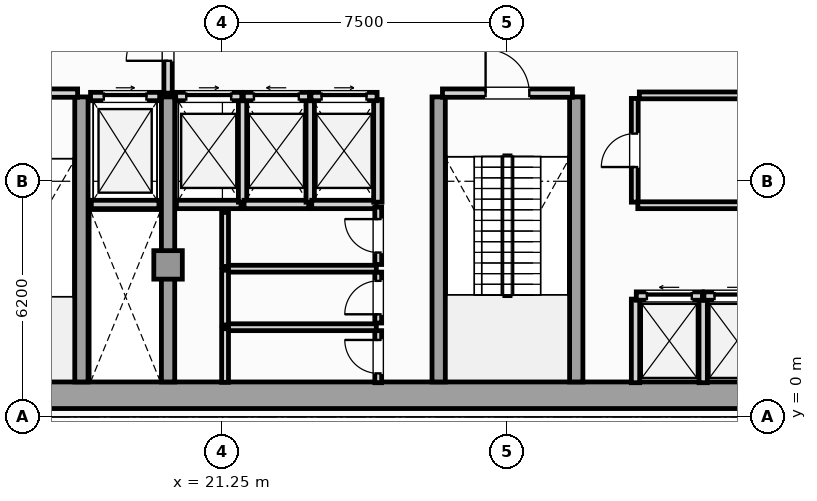
"""IFC4 building model, lengths in metres.
Left out: names, types, materials, properties, quantities, classifications, styles, units other than length and angle.
Written with IfcOpenShell. Run it as: python <this file> out.ifc"""

import sys

from ifc_helpers import new_model, si_unit, direction, frame, frame_2d, origin, origin_2d, place, context, subcontext, project, spatial, rectangle, extrude, element, fill, save


model = new_model("IFC4")
c1 = context("Model", 3, precision=1e-05, world=origin(), true_north=direction((0.0, 1.0)))
c2 = subcontext(c1, "Body", "Model", "MODEL_VIEW")
j1 = project(units=[si_unit("LENGTHUNIT", "METRE"), si_unit("PLANEANGLEUNIT", "RADIAN")], contexts=[c1])
p1 = place(None, origin())
s1 = spatial("IfcSite", under=j1, at=p1, CompositionType="ELEMENT")
p2 = place(p1, origin())
s2 = spatial("IfcBuilding", under=s1, at=p2, CompositionType="ELEMENT")
p3 = place(p2, frame((0.0, 0.0, 140.15)))
s3 = spatial("IfcBuildingStorey", under=s2, at=p3, CompositionType="ELEMENT", Elevation=140.15)
p4 = place(p3, frame((13.25, 0.57, 0.0), z_axis=(0.0, 0.0, 1.0), x_axis=(1.0, 0.0, 0.0)))
e1 = element("IfcWall", 1, at=p4, inside=s3, PredefinedType="SHEAR", context=c2, shape_type="SweptSolid", body=[
    extrude(rectangle(XDim=31.0, YDim=0.7, at=frame_2d((15.5, 0.0))), origin(), (0.0, 0.0, 1.0), 4.83),
])
for number, where, z_axis, x_axis in (
    (2, (17.54, 0.92, 0.0), (0.0, 0.0, 1.0), (0.0, 1.0, 0.0)),
    (3, (19.82, 0.92, 0.0), (0.0, 0.0, 1.0), (0.0, 1.0, 0.0)),
    (4, (26.94, 0.92, 0.0), (0.0, 0.0, 1.0), (0.0, 1.0, 0.0)),
    (5, (30.56, 0.92, 0.0), (0.0, 0.0, 1.0), (0.0, 1.0, 0.0)),
):
    element("IfcWall", number, at=place(p3, frame(where, z_axis=z_axis, x_axis=x_axis)), inside=s3, PredefinedType="SHEAR", context=c2, shape_type="SweptSolid", body=[
        extrude(rectangle(XDim=7.5, YDim=0.35, at=frame_2d((3.75, 0.0))), origin(), (0.0, 0.0, 1.0), 4.83),
    ])
p5 = place(p3, frame((19.82, 4.0, 0.0), z_axis=(0.0, 0.0, 1.0), x_axis=(1.0, 0.0, 0.0)))
e6 = element("IfcColumn", 6, at=p5, inside=s3, PredefinedType="COLUMN", context=c2, shape_type="SweptSolid", body=[
    extrude(rectangle(XDim=0.75, YDim=0.75, at=origin_2d()), origin(), (0.0, 0.0, 1.0), 5.05),
])
p6 = place(p3, frame((17.8, 5.59, 0.0), z_axis=(0.0, 0.0, 1.0), x_axis=(1.0, 0.0, 0.0)))
e7 = element("IfcWall", 7, at=p6, inside=s3, PredefinedType="SOLIDWALL", context=c2, shape_type="SweptSolid", body=[
    extrude(rectangle(XDim=1.78, YDim=0.22, at=frame_2d((0.89, 0.0))), origin(), (0.0, 0.0, 1.0), 4.83),
])
p7 = place(p3, frame((17.78, 8.43, 0.0), z_axis=(0.0, 0.0, 1.0), x_axis=(1.0, 0.0, 0.0)))
e8 = element("IfcWall", 8, at=p7, inside=s3, PredefinedType="SOLIDWALL", context=c2, shape_type="SweptSolid", body=[
    extrude(rectangle(XDim=1.82, YDim=0.22, at=frame_2d((0.91, 0.0))), origin(), (0.0, 0.0, 1.0), 4.83),
])
p8 = place(p7, frame((0.35, 0.0, 0.0)))
e9 = element("IfcOpeningElement", 9, at=p8, cuts=e8, PredefinedType="OPENING", context=c2, shape_type="SweptSolid", body=[
    extrude(rectangle(XDim=1.12, YDim=2.25, at=frame_2d((0.56, 1.125))), frame((0.0, 0.12, 0.0), z_axis=(0.0, -1.0, 0.0), x_axis=(1.0, 0.0, 0.0)), (0.0, 0.0, 1.0), 0.24),
])
for number, where, z_axis, x_axis in (
    (10, (32.12, 0.9, 0.0), (0.0, 0.0, 1.0), (0.0, 1.0, 0.0)),
    (11, (33.9, 0.9, 0.0), (0.0, 0.0, 1.0), (0.0, 1.0, 0.0)),
):
    element("IfcWall", number, at=place(p3, frame(where, z_axis=z_axis, x_axis=x_axis)), inside=s3, PredefinedType="SOLIDWALL", context=c2, shape_type="SweptSolid", body=[
        extrude(rectangle(XDim=2.2, YDim=0.22, at=frame_2d((1.1, 0.0))), origin(), (0.0, 0.0, 1.0), 4.83),
    ])
p9 = place(p3, frame((32.14, 3.18, 0.0), z_axis=(0.0, 0.0, 1.0), x_axis=(1.0, 0.0, 0.0)))
e12 = element("IfcWall", 12, at=p9, inside=s3, PredefinedType="SOLIDWALL", context=c2, shape_type="SweptSolid", body=[
    extrude(rectangle(XDim=1.74, YDim=0.22, at=frame_2d((0.87, 0.0))), origin(), (0.0, 0.0, 1.0), 4.83),
])
p10 = place(p9, frame((0.28, 0.0, 0.0)))
e13 = element("IfcOpeningElement", 13, at=p10, cuts=e12, PredefinedType="OPENING", context=c2, shape_type="SweptSolid", body=[
    extrude(rectangle(XDim=1.18, YDim=2.2, at=frame_2d((0.59, 1.1))), frame((0.0, 0.12, 0.0), z_axis=(0.0, -1.0, 0.0), x_axis=(1.0, 0.0, 0.0)), (0.0, 0.0, 1.0), 0.24),
])
p11 = place(p3, frame((33.92, 3.18, 0.0), z_axis=(0.0, 0.0, 1.0), x_axis=(1.0, 0.0, 0.0)))
e14 = element("IfcWall", 14, at=p11, inside=s3, PredefinedType="SOLIDWALL", context=c2, shape_type="SweptSolid", body=[
    extrude(rectangle(XDim=1.74, YDim=0.22, at=frame_2d((0.87, 0.0))), origin(), (0.0, 0.0, 1.0), 4.83),
])
p12 = place(p11, frame((0.28, 0.0, 0.0)))
e15 = element("IfcOpeningElement", 15, at=p12, cuts=e14, PredefinedType="OPENING", context=c2, shape_type="SweptSolid", body=[
    extrude(rectangle(XDim=1.18, YDim=2.2, at=frame_2d((0.59, 1.1))), frame((0.0, 0.12, 0.0), z_axis=(0.0, -1.0, 0.0), x_axis=(1.0, 0.0, 0.0)), (0.0, 0.0, 1.0), 0.24),
])
p13 = place(p3, frame((20.04, 5.59, 0.0), z_axis=(0.0, 0.0, 1.0), x_axis=(1.0, 0.0, 0.0)))
e16 = element("IfcWall", 16, at=p13, inside=s3, PredefinedType="SOLIDWALL", context=c2, shape_type="SweptSolid", body=[
    extrude(rectangle(XDim=1.7, YDim=0.22, at=frame_2d((0.85, 0.0))), origin(), (0.0, 0.0, 1.0), 4.83),
])
p14 = place(p3, frame((21.78, 5.65, 0.0), z_axis=(0.0, 0.0, 1.0), x_axis=(0.0, 1.0, 0.0)))
e17 = element("IfcWall", 17, at=p14, inside=s3, PredefinedType="SOLIDWALL", context=c2, shape_type="SweptSolid", body=[
    extrude(rectangle(XDim=2.7, YDim=0.22, at=frame_2d((1.35, 0.0))), origin(), (0.0, 0.0, 1.0), 4.83),
])
p15 = place(p3, frame((20.02, 8.43, 0.0), z_axis=(0.0, 0.0, 1.0), x_axis=(1.0, 0.0, 0.0)))
e18 = element("IfcWall", 18, at=p15, inside=s3, PredefinedType="SOLIDWALL", context=c2, shape_type="SweptSolid", body=[
    extrude(rectangle(XDim=1.74, YDim=0.22, at=frame_2d((0.87, 0.0))), origin(), (0.0, 0.0, 1.0), 4.83),
])
p16 = place(p15, frame((0.28, 0.0, 0.0)))
e19 = element("IfcOpeningElement", 19, at=p16, cuts=e18, PredefinedType="OPENING", context=c2, shape_type="SweptSolid", body=[
    extrude(rectangle(XDim=1.18, YDim=2.2, at=frame_2d((0.59, 1.1))), frame((0.0, 0.12, 0.0), z_axis=(0.0, -1.0, 0.0), x_axis=(1.0, 0.0, 0.0)), (0.0, 0.0, 1.0), 0.24),
])
p17 = place(p3, frame((21.82, 5.59, 0.0), z_axis=(0.0, 0.0, 1.0), x_axis=(1.0, 0.0, 0.0)))
e20 = element("IfcWall", 20, at=p17, inside=s3, PredefinedType="SOLIDWALL", context=c2, shape_type="SweptSolid", body=[
    extrude(rectangle(XDim=1.7, YDim=0.22, at=frame_2d((0.85, 0.0))), origin(), (0.0, 0.0, 1.0), 4.83),
])
p18 = place(p3, frame((23.56, 5.65, 0.0), z_axis=(0.0, 0.0, 1.0), x_axis=(0.0, 1.0, 0.0)))
e21 = element("IfcWall", 21, at=p18, inside=s3, PredefinedType="SOLIDWALL", context=c2, shape_type="SweptSolid", body=[
    extrude(rectangle(XDim=2.7, YDim=0.22, at=frame_2d((1.35, 0.0))), origin(), (0.0, 0.0, 1.0), 4.83),
])
p19 = place(p3, frame((21.8, 8.43, 0.0), z_axis=(0.0, 0.0, 1.0), x_axis=(1.0, 0.0, 0.0)))
e22 = element("IfcWall", 22, at=p19, inside=s3, PredefinedType="SOLIDWALL", context=c2, shape_type="SweptSolid", body=[
    extrude(rectangle(XDim=1.74, YDim=0.22, at=frame_2d((0.87, 0.0))), origin(), (0.0, 0.0, 1.0), 4.83),
])
p20 = place(p19, frame((0.28, 0.0, 0.0)))
e23 = element("IfcOpeningElement", 23, at=p20, cuts=e22, PredefinedType="OPENING", context=c2, shape_type="SweptSolid", body=[
    extrude(rectangle(XDim=1.18, YDim=2.2, at=frame_2d((0.59, 1.1))), frame((0.0, 0.12, 0.0), z_axis=(0.0, -1.0, 0.0), x_axis=(1.0, 0.0, 0.0)), (0.0, 0.0, 1.0), 0.24),
])
p21 = place(p3, frame((23.6, 5.59, 0.0), z_axis=(0.0, 0.0, 1.0), x_axis=(1.0, 0.0, 0.0)))
e24 = element("IfcWall", 24, at=p21, inside=s3, PredefinedType="SOLIDWALL", context=c2, shape_type="SweptSolid", body=[
    extrude(rectangle(XDim=1.7, YDim=0.22, at=frame_2d((0.85, 0.0))), origin(), (0.0, 0.0, 1.0), 4.83),
])
p22 = place(p3, frame((25.34, 5.65, 0.0), z_axis=(0.0, 0.0, 1.0), x_axis=(0.0, 1.0, 0.0)))
e25 = element("IfcWall", 25, at=p22, inside=s3, PredefinedType="SOLIDWALL", context=c2, shape_type="SweptSolid", body=[
    extrude(rectangle(XDim=2.7, YDim=0.22, at=frame_2d((1.35, 0.0))), origin(), (0.0, 0.0, 1.0), 4.83),
])
p23 = place(p3, frame((23.58, 8.43, 0.0), z_axis=(0.0, 0.0, 1.0), x_axis=(1.0, 0.0, 0.0)))
e26 = element("IfcWall", 26, at=p23, inside=s3, PredefinedType="SOLIDWALL", context=c2, shape_type="SweptSolid", body=[
    extrude(rectangle(XDim=1.74, YDim=0.22, at=frame_2d((0.87, 0.0))), origin(), (0.0, 0.0, 1.0), 4.83),
])
p24 = place(p23, frame((0.28, 0.0, 0.0)))
e27 = element("IfcOpeningElement", 27, at=p24, cuts=e26, PredefinedType="OPENING", context=c2, shape_type="SweptSolid", body=[
    extrude(rectangle(XDim=1.18, YDim=2.2, at=frame_2d((0.59, 1.1))), frame((0.0, 0.12, 0.0), z_axis=(0.0, -1.0, 0.0), x_axis=(1.0, 0.0, 0.0)), (0.0, 0.0, 1.0), 0.24),
])
p25 = place(p3, frame((14.04, 8.52, 0.0), z_axis=(0.0, 0.0, 1.0), x_axis=(1.0, 0.0, 0.0)))
e28 = element("IfcWall", 28, at=p25, inside=s3, PredefinedType="SOLIDWALL", context=c2, shape_type="SweptSolid", body=[
    extrude(rectangle(XDim=3.4, YDim=0.22, at=frame_2d((1.7, 0.0))), origin(), (0.0, 0.0, 1.0), 4.83),
])
p26 = place(p25, frame((1.125, 0.0, 0.0)))
e29 = element("IfcOpeningElement", 29, at=p26, cuts=e28, PredefinedType="OPENING", context=c2, shape_type="SweptSolid", body=[
    extrude(rectangle(XDim=1.15, YDim=2.2, at=frame_2d((0.575, 1.1))), frame((0.0, 0.12, 0.0), z_axis=(0.0, -1.0, 0.0), x_axis=(1.0, 0.0, 0.0)), (0.0, 0.0, 1.0), 0.24),
])
p27 = place(p3, frame((27.04, 8.52, 0.0), z_axis=(0.0, 0.0, 1.0), x_axis=(1.0, 0.0, 0.0)))
e30 = element("IfcWall", 30, at=p27, inside=s3, PredefinedType="SOLIDWALL", context=c2, shape_type="SweptSolid", body=[
    extrude(rectangle(XDim=3.42, YDim=0.22, at=frame_2d((1.71, 0.0))), origin(), (0.0, 0.0, 1.0), 4.83),
])
p28 = place(p27, frame((1.135, 0.0, 0.0)))
e31 = element("IfcOpeningElement", 31, at=p28, cuts=e30, PredefinedType="OPENING", context=c2, shape_type="SweptSolid", body=[
    extrude(rectangle(XDim=1.15, YDim=2.2, at=frame_2d((0.575, 1.1))), frame((0.0, 0.12, 0.0), z_axis=(0.0, -1.0, 0.0), x_axis=(1.0, 0.0, 0.0)), (0.0, 0.0, 1.0), 0.24),
])
p29 = place(p3, frame((19.82, 8.52, 0.0), z_axis=(0.0, 0.0, 1.0), x_axis=(0.0, 1.0, 0.0)))
e32 = element("IfcWall", 32, at=p29, inside=s3, PredefinedType="SOLIDWALL", context=c2, shape_type="SweptSolid", body=[
    extrude(rectangle(XDim=2.8, YDim=0.22, at=frame_2d((1.4, 0.0))), origin(), (0.0, 0.0, 1.0), 4.286),
])
p30 = place(p29, frame((0.85, 0.0, 0.0)))
e33 = element("IfcOpeningElement", 33, at=p30, cuts=e32, PredefinedType="OPENING", context=c2, shape_type="SweptSolid", body=[
    extrude(rectangle(XDim=1.1, YDim=2.2, at=frame_2d((0.55, 1.1))), frame((0.0, 0.12, 0.0), z_axis=(0.0, -1.0, 0.0), x_axis=(1.0, 0.0, 0.0)), (0.0, 0.0, 1.0), 0.24),
])
p31 = place(p3, frame((25.35, 0.9, 0.0), z_axis=(0.0, 0.0, 1.0), x_axis=(0.0, 1.0, 0.0)))
e34 = element("IfcWall", 34, at=p31, inside=s3, PredefinedType="PARTITIONING", context=c2, shape_type="SweptSolid", body=[
    extrude(rectangle(XDim=1.37, YDim=0.18, at=frame_2d((0.685, 0.0))), origin(), (0.0, 0.0, 1.0), 4.83),
])
p32 = place(p31, frame((0.245, 0.0, 0.0)))
e35 = element("IfcOpeningElement", 35, at=p32, cuts=e34, PredefinedType="OPENING", context=c2, shape_type="SweptSolid", body=[
    extrude(rectangle(XDim=0.88, YDim=2.05, at=frame_2d((0.44, 1.025))), frame((0.0, 0.1, 0.0), z_axis=(0.0, -1.0, 0.0), x_axis=(1.0, 0.0, 0.0)), (0.0, 0.0, 1.0), 0.2),
])
p33 = place(p3, frame((21.36, 2.36, 0.0), z_axis=(0.0, 0.0, 1.0), x_axis=(1.0, 0.0, 0.0)))
e36 = element("IfcWall", 36, at=p33, inside=s3, PredefinedType="PARTITIONING", context=c2, shape_type="SweptSolid", body=[
    extrude(rectangle(XDim=3.94, YDim=0.18, at=frame_2d((1.97, 0.0))), origin(), (0.0, 0.0, 1.0), 4.83),
])
p34 = place(p3, frame((21.32, 0.91, 0.0), z_axis=(0.0, 0.0, 1.0), x_axis=(0.0, 1.0, 0.0)))
e37 = element("IfcWall", 37, at=p34, inside=s3, PredefinedType="PARTITIONING", context=c2, shape_type="SweptSolid", body=[
    extrude(rectangle(XDim=1.41, YDim=0.18, at=frame_2d((0.705, 0.0))), origin(), (0.0, 0.0, 1.0), 4.83),
])
p35 = place(p3, frame((25.35, 2.47, 0.0), z_axis=(0.0, 0.0, 1.0), x_axis=(0.0, 1.0, 0.0)))
e38 = element("IfcWall", 38, at=p35, inside=s3, PredefinedType="PARTITIONING", context=c2, shape_type="SweptSolid", body=[
    extrude(rectangle(XDim=1.34, YDim=0.18, at=frame_2d((0.67, 0.0))), origin(), (0.0, 0.0, 1.0), 4.83),
])
p36 = place(p35, frame((0.23, 0.0, 0.0)))
e39 = element("IfcOpeningElement", 39, at=p36, cuts=e38, PredefinedType="OPENING", context=c2, shape_type="SweptSolid", body=[
    extrude(rectangle(XDim=0.88, YDim=2.05, at=frame_2d((0.44, 1.025))), frame((0.0, 0.1, 0.0), z_axis=(0.0, -1.0, 0.0), x_axis=(1.0, 0.0, 0.0)), (0.0, 0.0, 1.0), 0.2),
])
p37 = place(p3, frame((21.36, 3.9, 0.0), z_axis=(0.0, 0.0, 1.0), x_axis=(1.0, 0.0, 0.0)))
e40 = element("IfcWall", 40, at=p37, inside=s3, PredefinedType="PARTITIONING", context=c2, shape_type="SweptSolid", body=[
    extrude(rectangle(XDim=3.94, YDim=0.18, at=frame_2d((1.97, 0.0))), origin(), (0.0, 0.0, 1.0), 4.83),
])
p38 = place(p3, frame((21.32, 2.42, 0.0), z_axis=(0.0, 0.0, 1.0), x_axis=(0.0, 1.0, 0.0)))
e41 = element("IfcWall", 41, at=p38, inside=s3, PredefinedType="PARTITIONING", context=c2, shape_type="SweptSolid", body=[
    extrude(rectangle(XDim=1.44, YDim=0.18, at=frame_2d((0.72, 0.0))), origin(), (0.0, 0.0, 1.0), 4.83),
])
p39 = place(p3, frame((25.35, 4.01, 0.0), z_axis=(0.0, 0.0, 1.0), x_axis=(0.0, 1.0, 0.0)))
e42 = element("IfcWall", 42, at=p39, inside=s3, PredefinedType="PARTITIONING", context=c2, shape_type="SweptSolid", body=[
    extrude(rectangle(XDim=1.51, YDim=0.18, at=frame_2d((0.755, 0.0))), origin(), (0.0, 0.0, 1.0), 4.83),
])
p40 = place(p39, frame((0.315, 0.0, 0.0)))
e43 = element("IfcOpeningElement", 43, at=p40, cuts=e42, PredefinedType="OPENING", context=c2, shape_type="SweptSolid", body=[
    extrude(rectangle(XDim=0.88, YDim=2.05, at=frame_2d((0.44, 1.025))), frame((0.0, 0.1, 0.0), z_axis=(0.0, -1.0, 0.0), x_axis=(1.0, 0.0, 0.0)), (0.0, 0.0, 1.0), 0.2),
])
p41 = place(p3, frame((21.32, 3.96, 0.0), z_axis=(0.0, 0.0, 1.0), x_axis=(0.0, 1.0, 0.0)))
e44 = element("IfcWall", 44, at=p41, inside=s3, PredefinedType="PARTITIONING", context=c2, shape_type="SweptSolid", body=[
    extrude(rectangle(XDim=1.42, YDim=0.18, at=frame_2d((0.71, 0.0))), origin(), (0.0, 0.0, 1.0), 4.83),
])
p42 = place(p3, frame((32.1, 5.65, 0.0), z_axis=(0.0, 0.0, 1.0), x_axis=(0.0, 1.0, 0.0)))
e45 = element("IfcWall", 45, at=p42, inside=s3, PredefinedType="PARTITIONING", context=c2, shape_type="SweptSolid", body=[
    extrude(rectangle(XDim=2.73, YDim=0.18, at=frame_2d((1.365, 0.0))), origin(), (0.0, 0.0, 1.0), 4.83),
])
p43 = place(p42, frame((0.925, 0.0, 0.0)))
e46 = element("IfcOpeningElement", 46, at=p43, cuts=e45, PredefinedType="OPENING", context=c2, shape_type="SweptSolid", body=[
    extrude(rectangle(XDim=0.88, YDim=2.05, at=frame_2d((0.44, 1.025))), frame((0.0, 0.1, 0.0), z_axis=(0.0, -1.0, 0.0), x_axis=(1.0, 0.0, 0.0)), (0.0, 0.0, 1.0), 0.2),
])
p44 = place(p3, frame((32.22, 8.46, 0.0), z_axis=(0.0, 0.0, 1.0), x_axis=(1.0, 0.0, 0.0)))
e47 = element("IfcWall", 47, at=p44, inside=s3, PredefinedType="PARTITIONING", context=c2, shape_type="SweptSolid", body=[
    extrude(rectangle(XDim=2.88, YDim=0.18, at=frame_2d((1.44, 0.0))), origin(), (0.0, 0.0, 1.0), 4.83),
])
p45 = place(p3, frame((32.18, 5.57, 0.0), z_axis=(0.0, 0.0, 1.0), x_axis=(1.0, 0.0, 0.0)))
e48 = element("IfcWall", 48, at=p45, inside=s3, PredefinedType="PARTITIONING", context=c2, shape_type="SweptSolid", body=[
    extrude(rectangle(XDim=2.92, YDim=0.18, at=frame_2d((1.46, 0.0))), origin(), (0.0, 0.0, 1.0), 4.83),
])
p46 = place(p8, origin())
e49 = element("IfcDoor", 49, at=p46, inside=s3, OperationType="SLIDING_TO_RIGHT", PredefinedType="DOOR", context=c2, shape_type="SweptSolid", body=[
    extrude(rectangle(XDim=1.12, YDim=2.25, at=frame_2d((0.56, 1.125))), frame((0.0, 0.025, 0.0), z_axis=(0.0, -1.0, 0.0), x_axis=(1.0, 0.0, 0.0)), (0.0, 0.0, 1.0), 0.05),
])
fill(e9, e49)
p47 = place(p10, origin())
e50 = element("IfcDoor", 50, at=p47, inside=s3, OperationType="SLIDING_TO_LEFT", PredefinedType="DOOR", context=c2, shape_type="SweptSolid", body=[
    extrude(rectangle(XDim=1.18, YDim=2.2, at=frame_2d((0.59, 1.1))), frame((0.0, 0.025, 0.0), z_axis=(0.0, -1.0, 0.0), x_axis=(1.0, 0.0, 0.0)), (0.0, 0.0, 1.0), 0.05),
])
fill(e13, e50)
p48 = place(p12, origin())
e51 = element("IfcDoor", 51, at=p48, inside=s3, OperationType="SLIDING_TO_RIGHT", PredefinedType="DOOR", context=c2, shape_type="SweptSolid", body=[
    extrude(rectangle(XDim=1.18, YDim=2.2, at=frame_2d((0.59, 1.1))), frame((0.0, 0.025, 0.0), z_axis=(0.0, -1.0, 0.0), x_axis=(1.0, 0.0, 0.0)), (0.0, 0.0, 1.0), 0.05),
])
fill(e15, e51)
p49 = place(p16, origin())
e52 = element("IfcDoor", 52, at=p49, inside=s3, OperationType="SLIDING_TO_RIGHT", PredefinedType="DOOR", context=c2, shape_type="SweptSolid", body=[
    extrude(rectangle(XDim=1.18, YDim=2.2, at=frame_2d((0.59, 1.1))), frame((0.0, 0.025, 0.0), z_axis=(0.0, -1.0, 0.0), x_axis=(1.0, 0.0, 0.0)), (0.0, 0.0, 1.0), 0.05),
])
fill(e19, e52)
p50 = place(p20, origin())
e53 = element("IfcDoor", 53, at=p50, inside=s3, OperationType="SLIDING_TO_LEFT", PredefinedType="DOOR", context=c2, shape_type="SweptSolid", body=[
    extrude(rectangle(XDim=1.18, YDim=2.2, at=frame_2d((0.59, 1.1))), frame((0.0, 0.025, 0.0), z_axis=(0.0, -1.0, 0.0), x_axis=(1.0, 0.0, 0.0)), (0.0, 0.0, 1.0), 0.05),
])
fill(e23, e53)
p51 = place(p24, origin())
e54 = element("IfcDoor", 54, at=p51, inside=s3, OperationType="SLIDING_TO_RIGHT", PredefinedType="DOOR", context=c2, shape_type="SweptSolid", body=[
    extrude(rectangle(XDim=1.18, YDim=2.2, at=frame_2d((0.59, 1.1))), frame((0.0, 0.025, 0.0), z_axis=(0.0, -1.0, 0.0), x_axis=(1.0, 0.0, 0.0)), (0.0, 0.0, 1.0), 0.05),
])
fill(e27, e54)
p52 = place(p28, origin())
e55 = element("IfcDoor", 55, at=p52, inside=s3, OperationType="SINGLE_SWING_LEFT", PredefinedType="DOOR", context=c2, shape_type="SweptSolid", body=[
    extrude(rectangle(XDim=1.15, YDim=2.2, at=frame_2d((0.575, 1.1))), frame((0.0, 0.025, 0.0), z_axis=(0.0, -1.0, 0.0), x_axis=(1.0, 0.0, 0.0)), (0.0, 0.0, 1.0), 0.05),
])
fill(e31, e55)
p53 = place(p30, origin())
e56 = element("IfcDoor", 56, at=p53, inside=s3, OperationType="SINGLE_SWING_LEFT", PredefinedType="DOOR", context=c2, shape_type="SweptSolid", body=[
    extrude(rectangle(XDim=1.1, YDim=2.2, at=frame_2d((0.55, 1.1))), frame((0.0, 0.025, 0.0), z_axis=(0.0, -1.0, 0.0), x_axis=(1.0, 0.0, 0.0)), (0.0, 0.0, 1.0), 0.05),
])
fill(e33, e56)
p54 = place(p32, origin())
e57 = element("IfcDoor", 57, at=p54, inside=s3, OperationType="SINGLE_SWING_RIGHT", PredefinedType="DOOR", context=c2, shape_type="SweptSolid", body=[
    extrude(rectangle(XDim=0.88, YDim=2.05, at=frame_2d((0.44, 1.025))), frame((0.0, 0.025, 0.0), z_axis=(0.0, -1.0, 0.0), x_axis=(1.0, 0.0, 0.0)), (0.0, 0.0, 1.0), 0.05),
])
fill(e35, e57)
p55 = place(p36, origin())
e58 = element("IfcDoor", 58, at=p55, inside=s3, OperationType="SINGLE_SWING_LEFT", PredefinedType="DOOR", context=c2, shape_type="SweptSolid", body=[
    extrude(rectangle(XDim=0.88, YDim=2.05, at=frame_2d((0.44, 1.025))), frame((0.0, 0.025, 0.0), z_axis=(0.0, -1.0, 0.0), x_axis=(1.0, 0.0, 0.0)), (0.0, 0.0, 1.0), 0.05),
])
fill(e39, e58)
p56 = place(p40, origin())
e59 = element("IfcDoor", 59, at=p56, inside=s3, OperationType="SINGLE_SWING_RIGHT", PredefinedType="DOOR", context=c2, shape_type="SweptSolid", body=[
    extrude(rectangle(XDim=0.88, YDim=2.05, at=frame_2d((0.44, 1.025))), frame((0.0, 0.025, 0.0), z_axis=(0.0, -1.0, 0.0), x_axis=(1.0, 0.0, 0.0)), (0.0, 0.0, 1.0), 0.05),
])
fill(e43, e59)
p57 = place(p43, origin())
e60 = element("IfcDoor", 60, at=p57, inside=s3, OperationType="SINGLE_SWING_LEFT", PredefinedType="DOOR", context=c2, shape_type="SweptSolid", body=[
    extrude(rectangle(XDim=0.88, YDim=2.05, at=frame_2d((0.44, 1.025))), frame((0.0, 0.025, 0.0), z_axis=(0.0, -1.0, 0.0), x_axis=(1.0, 0.0, 0.0)), (0.0, 0.0, 1.0), 0.05),
])
fill(e46, e60)
save(model, sys.argv[1])
